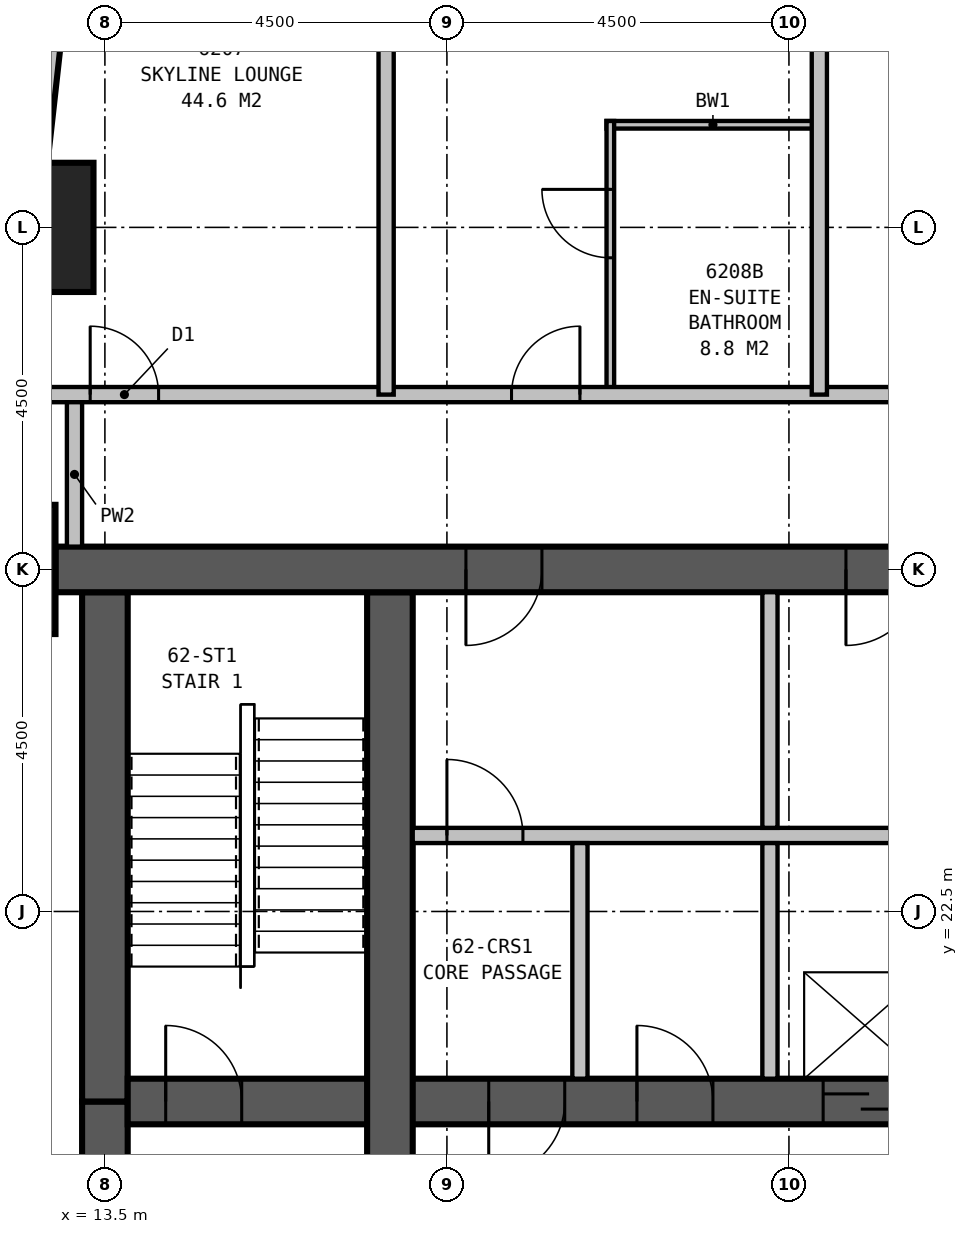
"""IFC4 building model, lengths in metres.
Left out: names, types, materials, properties, quantities, classifications, styles, units other than length and angle.
Written with IfcOpenShell. Run it as: python <this file> out.ifc"""

import sys

from ifc_helpers import new_model, si_unit, direction, frame, frame_2d, origin, origin_2d, place, context, subcontext, project, spatial, rectangle, extrude, element, fill, save


model = new_model("IFC4")
c1 = context("Model", 3, precision=1e-05, world=origin(), true_north=direction((0.0, 1.0)))
c2 = subcontext(c1, "Body", "Model", "MODEL_VIEW")
j1 = project(units=[si_unit("LENGTHUNIT", "METRE"), si_unit("PLANEANGLEUNIT", "RADIAN")], contexts=[c1])
p1 = place(None, origin())
s1 = spatial("IfcSite", under=j1, at=p1, CompositionType="ELEMENT")
p2 = place(p1, origin())
s2 = spatial("IfcBuilding", under=s1, at=p2, CompositionType="ELEMENT")
p3 = place(p2, frame((0.0, 0.0, 240.8)))
s3 = spatial("IfcBuildingStorey", under=s2, at=p3, CompositionType="ELEMENT", Elevation=240.8)
for number, where, z_axis, x_axis in (
    (1, (12.5, 31.5, 0.0), (0.0, 0.0, 1.0), (1.0, 0.0, 0.0)),
    (2, (12.0, 27.0, 0.0), (0.0, 0.0, 1.0), (1.0, 0.0, 0.0)),
):
    element("IfcColumn", number, at=place(p3, frame(where, z_axis=z_axis, x_axis=x_axis)), inside=s3, PredefinedType="COLUMN", context=c2, shape_type="SweptSolid", body=[
        extrude(rectangle(XDim=1.7, YDim=1.7, at=origin_2d()), origin(), (0.0, 0.0, 1.0), 3.9),
    ])
p4 = place(p3, frame((36.3, 27.0, 0.0), z_axis=(0.0, 0.0, 1.0), x_axis=(-1.0, 0.0, 0.0)))
e3 = element("IfcWall", 3, at=p4, inside=s3, PredefinedType="SHEAR", context=c2, shape_type="SweptSolid", body=[
    extrude(rectangle(XDim=23.45, YDim=0.6, at=frame_2d((11.725, 0.0))), origin(), (0.0, 0.0, 1.0), 3.9),
])
p5 = place(p4, frame((17.05, 0.0, 0.0)))
e4 = element("IfcOpeningElement", 4, at=p5, cuts=e3, PredefinedType="OPENING", context=c2, shape_type="SweptSolid", body=[
    extrude(rectangle(XDim=1.0, YDim=2.1, at=frame_2d((0.5, 1.05))), frame((0.0, 0.31, 0.0), z_axis=(0.0, -1.0, 0.0), x_axis=(1.0, 0.0, 0.0)), (0.0, 0.0, 1.0), 0.62),
])
p6 = place(p4, frame((12.05, 0.0, 0.0)))
e5 = element("IfcOpeningElement", 5, at=p6, cuts=e3, PredefinedType="OPENING", context=c2, shape_type="SweptSolid", body=[
    extrude(rectangle(XDim=1.0, YDim=2.1, at=frame_2d((0.5, 1.05))), frame((0.0, 0.31, 0.0), z_axis=(0.0, -1.0, 0.0), x_axis=(1.0, 0.0, 0.0)), (0.0, 0.0, 1.0), 0.62),
])
p7 = place(p4, frame((7.05, 0.0, 0.0)))
e6 = element("IfcOpeningElement", 6, at=p7, cuts=e3, PredefinedType="OPENING", context=c2, shape_type="SweptSolid", body=[
    extrude(rectangle(XDim=1.0, YDim=2.1, at=frame_2d((0.5, 1.05))), frame((0.0, 0.31, 0.0), z_axis=(0.0, -1.0, 0.0), x_axis=(1.0, 0.0, 0.0)), (0.0, 0.0, 1.0), 0.62),
])
p8 = place(p3, frame((17.25, 13.8, 0.0), z_axis=(0.0, 0.0, 1.0), x_axis=(0.0, 1.0, 0.0)))
e7 = element("IfcWall", 7, at=p8, inside=s3, PredefinedType="SHEAR", context=c2, shape_type="SweptSolid", body=[
    extrude(rectangle(XDim=12.9, YDim=0.6, at=frame_2d((6.45, 0.0))), origin(), (0.0, 0.0, 1.0), 3.9),
])
p9 = place(p8, frame((3.85, 0.0, 0.0)))
e8 = element("IfcOpeningElement", 8, at=p9, cuts=e7, PredefinedType="OPENING", context=c2, shape_type="SweptSolid", body=[
    extrude(rectangle(XDim=1.2, YDim=2.1, at=frame_2d((0.6, 1.05))), frame((0.0, 0.31, 0.0), z_axis=(0.0, -1.0, 0.0), x_axis=(1.0, 0.0, 0.0)), (0.0, 0.0, 1.0), 0.62),
])
p10 = place(p3, frame((13.8, 20.0, 0.0), z_axis=(0.0, 0.0, 1.0), x_axis=(1.0, 0.0, 0.0)))
e9 = element("IfcWall", 9, at=p10, inside=s3, PredefinedType="SHEAR", context=c2, shape_type="SweptSolid", body=[
    extrude(rectangle(XDim=21.9, YDim=0.6, at=frame_2d((10.95, 0.0))), origin(), (0.0, 0.0, 1.0), 3.9),
])
p11 = place(p10, frame((0.5, 0.0, 0.0)))
e10 = element("IfcOpeningElement", 10, at=p11, cuts=e9, PredefinedType="OPENING", context=c2, shape_type="SweptSolid", body=[
    extrude(rectangle(XDim=1.0, YDim=2.1, at=frame_2d((0.5, 1.05))), frame((0.0, 0.31, 0.0), z_axis=(0.0, -1.0, 0.0), x_axis=(1.0, 0.0, 0.0)), (0.0, 0.0, 1.0), 0.62),
])
p12 = place(p10, frame((20.5, 0.0, 0.0)))
e11 = element("IfcOpeningElement", 11, at=p12, cuts=e9, PredefinedType="OPENING", context=c2, shape_type="SweptSolid", body=[
    extrude(rectangle(XDim=1.0, YDim=2.1, at=frame_2d((0.5, 1.05))), frame((0.0, 0.31, 0.0), z_axis=(0.0, -1.0, 0.0), x_axis=(1.0, 0.0, 0.0)), (0.0, 0.0, 1.0), 0.62),
])
p13 = place(p10, frame((9.15, 0.0, 0.0)))
e12 = element("IfcOpeningElement", 12, at=p13, cuts=e9, PredefinedType="OPENING", context=c2, shape_type="SweptSolid", body=[
    extrude(rectangle(XDim=1.1, YDim=2.1, at=frame_2d((0.55, 1.05))), frame((0.0, 0.31, 0.0), z_axis=(0.0, -1.0, 0.0), x_axis=(1.0, 0.0, 0.0)), (0.0, 0.0, 1.0), 0.62),
])
p14 = place(p10, frame((11.65, 0.0, 0.0)))
e13 = element("IfcOpeningElement", 13, at=p14, cuts=e9, PredefinedType="OPENING", context=c2, shape_type="SweptSolid", body=[
    extrude(rectangle(XDim=1.1, YDim=2.1, at=frame_2d((0.55, 1.05))), frame((0.0, 0.31, 0.0), z_axis=(0.0, -1.0, 0.0), x_axis=(1.0, 0.0, 0.0)), (0.0, 0.0, 1.0), 0.62),
])
p15 = place(p10, frame((14.15, 0.0, 0.0)))
e14 = element("IfcOpeningElement", 14, at=p15, cuts=e9, PredefinedType="OPENING", context=c2, shape_type="SweptSolid", body=[
    extrude(rectangle(XDim=1.1, YDim=2.1, at=frame_2d((0.55, 1.05))), frame((0.0, 0.31, 0.0), z_axis=(0.0, -1.0, 0.0), x_axis=(1.0, 0.0, 0.0)), (0.0, 0.0, 1.0), 0.62),
])
p16 = place(p10, frame((16.65, 0.0, 0.0)))
e15 = element("IfcOpeningElement", 15, at=p16, cuts=e9, PredefinedType="OPENING", context=c2, shape_type="SweptSolid", body=[
    extrude(rectangle(XDim=1.1, YDim=2.1, at=frame_2d((0.55, 1.05))), frame((0.0, 0.31, 0.0), z_axis=(0.0, -1.0, 0.0), x_axis=(1.0, 0.0, 0.0)), (0.0, 0.0, 1.0), 0.62),
])
p17 = place(p10, frame((5.75, 0.0, 0.0), z_axis=(0.0, 0.0, 1.0), x_axis=(-1.0, 0.0, 0.0)))
e16 = element("IfcOpeningElement", 16, at=p17, cuts=e9, PredefinedType="OPENING", context=c2, shape_type="SweptSolid", body=[
    extrude(rectangle(XDim=1.0, YDim=2.1, at=frame_2d((0.5, 1.05))), frame((0.0, 0.31, 0.0), z_axis=(0.0, -1.0, 0.0), x_axis=(1.0, 0.0, 0.0)), (0.0, 0.0, 1.0), 0.62),
])
p18 = place(p10, frame((6.7, 0.0, 0.0)))
e17 = element("IfcOpeningElement", 17, at=p18, cuts=e9, PredefinedType="OPENING", context=c2, shape_type="SweptSolid", body=[
    extrude(rectangle(XDim=1.0, YDim=2.1, at=frame_2d((0.5, 1.05))), frame((0.0, 0.31, 0.0), z_axis=(0.0, -1.0, 0.0), x_axis=(1.0, 0.0, 0.0)), (0.0, 0.0, 1.0), 0.62),
])
p19 = place(p3, frame((13.5, 26.7, 0.0), z_axis=(0.0, 0.0, 1.0), x_axis=(0.0, -1.0, 0.0)))
e18 = element("IfcWall", 18, at=p19, inside=s3, PredefinedType="SHEAR", context=c2, shape_type="SweptSolid", body=[
    extrude(rectangle(XDim=6.7, YDim=0.6, at=frame_2d((3.35, 0.0))), origin(), (0.0, 0.0, 1.0), 3.9),
])
p20 = place(p3, frame((13.5, 20.0, 0.0), z_axis=(0.0, 0.0, 1.0), x_axis=(0.0, -1.0, 0.0)))
e19 = element("IfcWall", 19, at=p20, inside=s3, PredefinedType="SHEAR", context=c2, shape_type="SweptSolid", body=[
    extrude(rectangle(XDim=3.5, YDim=0.6, at=frame_2d((1.75, 0.0))), origin(), (0.0, 0.0, 1.0), 3.9),
])
p21 = place(p20, frame((1.65, 0.0, 0.0)))
e20 = element("IfcOpeningElement", 20, at=p21, cuts=e19, PredefinedType="OPENING", context=c2, shape_type="SweptSolid", body=[
    extrude(rectangle(XDim=1.2, YDim=2.1, at=frame_2d((0.6, 1.05))), frame((0.0, 0.31, 0.0), z_axis=(0.0, -1.0, 0.0), x_axis=(1.0, 0.0, 0.0)), (0.0, 0.0, 1.0), 0.62),
])
p22 = place(p3, frame((13.517, 40.649, 0.0), z_axis=(0.0, 0.0, 1.0), x_axis=(-0.110433201132, -0.993883548555, 0.0)))
e21 = element("IfcWall", 21, at=p22, inside=s3, PredefinedType="STANDARD", context=c2, shape_type="SweptSolid", body=[
    extrude(rectangle(XDim=31.994, YDim=0.3, at=frame_2d((15.997, 0.0))), origin(), (0.0, 0.0, 1.0), 2.45),
])
p23 = place(p22, frame((1.664, 0.0, 0.5)))
e22 = element("IfcOpeningElement", 22, at=p23, cuts=e21, PredefinedType="OPENING", context=c2, shape_type="SweptSolid", body=[
    extrude(rectangle(XDim=1.5, YDim=1.75, at=frame_2d((0.75, 0.875))), frame((0.0, 0.16, 0.0), z_axis=(0.0, -1.0, 0.0), x_axis=(1.0, 0.0, 0.0)), (0.0, 0.0, 1.0), 0.32),
])
p24 = place(p22, frame((6.192, 0.0, 0.5)))
e23 = element("IfcOpeningElement", 23, at=p24, cuts=e21, PredefinedType="OPENING", context=c2, shape_type="SweptSolid", body=[
    extrude(rectangle(XDim=1.5, YDim=1.75, at=frame_2d((0.75, 0.875))), frame((0.0, 0.16, 0.0), z_axis=(0.0, -1.0, 0.0), x_axis=(1.0, 0.0, 0.0)), (0.0, 0.0, 1.0), 0.32),
])
p25 = place(p22, frame((15.247, 0.0, 0.5)))
e24 = element("IfcOpeningElement", 24, at=p25, cuts=e21, PredefinedType="OPENING", context=c2, shape_type="SweptSolid", body=[
    extrude(rectangle(XDim=1.5, YDim=1.75, at=frame_2d((0.75, 0.875))), frame((0.0, 0.16, 0.0), z_axis=(0.0, -1.0, 0.0), x_axis=(1.0, 0.0, 0.0)), (0.0, 0.0, 1.0), 0.32),
])
p26 = place(p22, frame((19.775, 0.0, 0.5)))
e25 = element("IfcOpeningElement", 25, at=p26, cuts=e21, PredefinedType="OPENING", context=c2, shape_type="SweptSolid", body=[
    extrude(rectangle(XDim=1.5, YDim=1.75, at=frame_2d((0.75, 0.875))), frame((0.0, 0.16, 0.0), z_axis=(0.0, -1.0, 0.0), x_axis=(1.0, 0.0, 0.0)), (0.0, 0.0, 1.0), 0.32),
])
p27 = place(p22, frame((24.302, 0.0, 0.5)))
e26 = element("IfcOpeningElement", 26, at=p27, cuts=e21, PredefinedType="OPENING", context=c2, shape_type="SweptSolid", body=[
    extrude(rectangle(XDim=1.5, YDim=1.75, at=frame_2d((0.75, 0.875))), frame((0.0, 0.16, 0.0), z_axis=(0.0, -1.0, 0.0), x_axis=(1.0, 0.0, 0.0)), (0.0, 0.0, 1.0), 0.32),
])
p28 = place(p22, frame((28.83, 0.0, 0.5)))
e27 = element("IfcOpeningElement", 27, at=p28, cuts=e21, PredefinedType="OPENING", context=c2, shape_type="SweptSolid", body=[
    extrude(rectangle(XDim=1.5, YDim=1.75, at=frame_2d((0.75, 0.875))), frame((0.0, 0.16, 0.0), z_axis=(0.0, -1.0, 0.0), x_axis=(1.0, 0.0, 0.0)), (0.0, 0.0, 1.0), 0.32),
])
p29 = place(p3, frame((12.406, 29.3, 0.0), z_axis=(0.0, 0.0, 1.0), x_axis=(1.0, 0.0, 0.0)))
e28 = element("IfcWall", 28, at=p29, inside=s3, PredefinedType="PARTITIONING", context=c2, shape_type="SweptSolid", body=[
    extrude(rectangle(XDim=25.894, YDim=0.2, at=frame_2d((12.947, 0.0))), origin(), (0.0, 0.0, 1.0), 3.65),
])
p30 = place(p29, frame((0.9, 0.0, 0.0)))
e29 = element("IfcOpeningElement", 29, at=p30, cuts=e28, PredefinedType="OPENING", context=c2, shape_type="SweptSolid", body=[
    extrude(rectangle(XDim=0.9, YDim=2.1, at=frame_2d((0.45, 1.05))), frame((0.0, 0.11, 0.0), z_axis=(0.0, -1.0, 0.0), x_axis=(1.0, 0.0, 0.0)), (0.0, 0.0, 1.0), 0.22),
])
p31 = place(p29, frame((6.444, 0.0, 0.0)))
e30 = element("IfcOpeningElement", 30, at=p31, cuts=e28, PredefinedType="OPENING", context=c2, shape_type="SweptSolid", body=[
    extrude(rectangle(XDim=0.9, YDim=2.1, at=frame_2d((0.45, 1.05))), frame((0.0, 0.11, 0.0), z_axis=(0.0, -1.0, 0.0), x_axis=(1.0, 0.0, 0.0)), (0.0, 0.0, 1.0), 0.22),
])
p32 = place(p29, frame((14.644, 0.0, 0.0)))
e31 = element("IfcOpeningElement", 31, at=p32, cuts=e28, PredefinedType="OPENING", context=c2, shape_type="SweptSolid", body=[
    extrude(rectangle(XDim=0.9, YDim=2.1, at=frame_2d((0.45, 1.05))), frame((0.0, 0.11, 0.0), z_axis=(0.0, -1.0, 0.0), x_axis=(1.0, 0.0, 0.0)), (0.0, 0.0, 1.0), 0.22),
])
p33 = place(p29, frame((24.293, 0.0, 0.0)))
e32 = element("IfcOpeningElement", 32, at=p33, cuts=e28, PredefinedType="OPENING", context=c2, shape_type="SweptSolid", body=[
    extrude(rectangle(XDim=0.9, YDim=2.1, at=frame_2d((0.45, 1.05))), frame((0.0, 0.11, 0.0), z_axis=(0.0, -1.0, 0.0), x_axis=(1.0, 0.0, 0.0)), (0.0, 0.0, 1.0), 0.22),
])
p34 = place(p3, frame((13.1, 27.3, 0.0), z_axis=(0.0, 0.0, 1.0), x_axis=(0.0, 1.0, 0.0)))
e33 = element("IfcWall", 33, at=p34, inside=s3, PredefinedType="PARTITIONING", context=c2, shape_type="SweptSolid", body=[
    extrude(rectangle(XDim=1.9, YDim=0.2, at=frame_2d((0.95, 0.0))), origin(), (0.0, 0.0, 1.0), 2.45),
])
for number, where, z_axis, x_axis in (
    (34, (17.2, 29.3, 0.0), (0.0, 0.0, 1.0), (0.0, 1.0, 0.0)),
    (35, (22.9, 29.3, 0.0), (0.0, 0.0, 1.0), (0.0, 1.0, 0.0)),
):
    element("IfcWall", number, at=place(p3, frame(where, z_axis=z_axis, x_axis=x_axis)), inside=s3, PredefinedType="PARTITIONING", context=c2, shape_type="SweptSolid", body=[
        extrude(rectangle(XDim=11.2, YDim=0.2, at=frame_2d((5.6, 0.0))), origin(), (0.0, 0.0, 1.0), 2.6),
    ])
p35 = place(p3, frame((20.1, 32.85, 0.0), z_axis=(0.0, 0.0, 1.0), x_axis=(1.0, 0.0, 0.0)))
e36 = element("IfcWall", 36, at=p35, inside=s3, PredefinedType="PLUMBINGWALL", context=c2, shape_type="SweptSolid", body=[
    extrude(rectangle(XDim=2.8, YDim=0.1, at=frame_2d((1.4, 0.0))), origin(), (0.0, 0.0, 1.0), 3.65),
])
p36 = place(p3, frame((20.15, 29.3, 0.0), z_axis=(0.0, 0.0, 1.0), x_axis=(0.0, 1.0, 0.0)))
e37 = element("IfcWall", 37, at=p36, inside=s3, PredefinedType="PLUMBINGWALL", context=c2, shape_type="SweptSolid", body=[
    extrude(rectangle(XDim=3.6, YDim=0.1, at=frame_2d((1.8, 0.0))), origin(), (0.0, 0.0, 1.0), 3.65),
])
p37 = place(p36, frame((1.8, 0.0, 0.0)))
e38 = element("IfcOpeningElement", 38, at=p37, cuts=e37, PredefinedType="OPENING", context=c2, shape_type="SweptSolid", body=[
    extrude(rectangle(XDim=0.9, YDim=2.1, at=frame_2d((0.45, 1.05))), frame((0.0, 0.06, 0.0), z_axis=(0.0, -1.0, 0.0), x_axis=(1.0, 0.0, 0.0)), (0.0, 0.0, 1.0), 0.12),
])
for number, where, z_axis, x_axis in (
    (39, (19.75, 20.3, 0.0), (0.0, 0.0, 1.0), (0.0, 1.0, 0.0)),
    (40, (22.25, 20.3, 0.0), (0.0, 0.0, 1.0), (0.0, 1.0, 0.0)),
):
    element("IfcWall", number, at=place(p3, frame(where, z_axis=z_axis, x_axis=x_axis)), inside=s3, PredefinedType="PARTITIONING", context=c2, shape_type="SweptSolid", body=[
        extrude(rectangle(XDim=3.1, YDim=0.2, at=frame_2d((1.55, 0.0))), origin(), (0.0, 0.0, 1.0), 3.65),
    ])
p38 = place(p3, frame((17.55, 23.5, 0.0), z_axis=(0.0, 0.0, 1.0), x_axis=(1.0, 0.0, 0.0)))
e41 = element("IfcWall", 41, at=p38, inside=s3, PredefinedType="PARTITIONING", context=c2, shape_type="SweptSolid", body=[
    extrude(rectangle(XDim=14.4, YDim=0.2, at=frame_2d((7.2, 0.0))), origin(), (0.0, 0.0, 1.0), 3.65),
])
p39 = place(p38, frame((0.45, 0.0, 0.0)))
e42 = element("IfcOpeningElement", 42, at=p39, cuts=e41, PredefinedType="OPENING", context=c2, shape_type="SweptSolid", body=[
    extrude(rectangle(XDim=1.0, YDim=2.1, at=frame_2d((0.5, 1.05))), frame((0.0, 0.11, 0.0), z_axis=(0.0, -1.0, 0.0), x_axis=(1.0, 0.0, 0.0)), (0.0, 0.0, 1.0), 0.22),
])
p40 = place(p3, frame((22.25, 23.6, 0.0), z_axis=(0.0, 0.0, 1.0), x_axis=(0.0, 1.0, 0.0)))
e43 = element("IfcWall", 43, at=p40, inside=s3, PredefinedType="PARTITIONING", context=c2, shape_type="SweptSolid", body=[
    extrude(rectangle(XDim=3.1, YDim=0.2, at=frame_2d((1.55, 0.0))), origin(), (0.0, 0.0, 1.0), 3.65),
])
p41 = place(p24, origin())
e44 = element("IfcWindow", 44, at=p41, inside=s3, PartitioningType="SINGLE_PANEL", PredefinedType="WINDOW", context=c2, shape_type="SweptSolid", body=[
    extrude(rectangle(XDim=1.5, YDim=1.75, at=frame_2d((0.75, 0.875))), frame((0.0, 0.03, 0.0), z_axis=(0.0, -1.0, 0.0), x_axis=(1.0, 0.0, 0.0)), (0.0, 0.0, 1.0), 0.06),
])
fill(e23, e44)
p42 = place(p30, origin())
e45 = element("IfcDoor", 45, at=p42, inside=s3, OperationType="SINGLE_SWING_LEFT", PredefinedType="DOOR", context=c2, shape_type="SweptSolid", body=[
    extrude(rectangle(XDim=0.9, YDim=2.1, at=frame_2d((0.45, 1.05))), frame((0.0, 0.025, 0.0), z_axis=(0.0, -1.0, 0.0), x_axis=(1.0, 0.0, 0.0)), (0.0, 0.0, 1.0), 0.05),
])
fill(e29, e45)
p43 = place(p31, origin())
e46 = element("IfcDoor", 46, at=p43, inside=s3, OperationType="SINGLE_SWING_RIGHT", PredefinedType="DOOR", context=c2, shape_type="SweptSolid", body=[
    extrude(rectangle(XDim=0.9, YDim=2.1, at=frame_2d((0.45, 1.05))), frame((0.0, 0.025, 0.0), z_axis=(0.0, -1.0, 0.0), x_axis=(1.0, 0.0, 0.0)), (0.0, 0.0, 1.0), 0.05),
])
fill(e30, e46)
p44 = place(p37, origin())
e47 = element("IfcDoor", 47, at=p44, inside=s3, OperationType="SINGLE_SWING_RIGHT", PredefinedType="DOOR", context=c2, shape_type="SweptSolid", body=[
    extrude(rectangle(XDim=0.9, YDim=2.1, at=frame_2d((0.45, 1.05))), frame((0.0, 0.025, 0.0), z_axis=(0.0, -1.0, 0.0), x_axis=(1.0, 0.0, 0.0)), (0.0, 0.0, 1.0), 0.05),
])
fill(e38, e47)
p45 = place(p39, origin())
e48 = element("IfcDoor", 48, at=p45, inside=s3, OperationType="SINGLE_SWING_LEFT", PredefinedType="DOOR", context=c2, shape_type="SweptSolid", body=[
    extrude(rectangle(XDim=1.0, YDim=2.1, at=frame_2d((0.5, 1.05))), frame((0.0, 0.025, 0.0), z_axis=(0.0, -1.0, 0.0), x_axis=(1.0, 0.0, 0.0)), (0.0, 0.0, 1.0), 0.05),
])
fill(e42, e48)
p46 = place(p11, origin())
e49 = element("IfcDoor", 49, at=p46, inside=s3, OperationType="SINGLE_SWING_LEFT", PredefinedType="DOOR", context=c2, shape_type="SweptSolid", body=[
    extrude(rectangle(XDim=1.0, YDim=2.1, at=frame_2d((0.5, 1.05))), frame((0.0, 0.3, 0.0), z_axis=(0.0, -1.0, 0.0), x_axis=(1.0, 0.0, 0.0)), (0.0, 0.0, 1.0), 0.6),
])
fill(e10, e49)
p47 = place(p13, origin())
e50 = element("IfcDoor", 50, at=p47, inside=s3, OperationType="SLIDING_TO_LEFT", PredefinedType="DOOR", context=c2, shape_type="SweptSolid", body=[
    extrude(rectangle(XDim=1.1, YDim=2.1, at=frame_2d((0.55, 1.05))), frame((0.0, 0.3, 0.0), z_axis=(0.0, -1.0, 0.0), x_axis=(1.0, 0.0, 0.0)), (0.0, 0.0, 1.0), 0.6),
])
fill(e12, e50)
p48 = place(p17, origin())
e51 = element("IfcDoor", 51, at=p48, inside=s3, OperationType="SINGLE_SWING_RIGHT", PredefinedType="DOOR", context=c2, shape_type="SweptSolid", body=[
    extrude(rectangle(XDim=1.0, YDim=2.1, at=frame_2d((0.5, 1.05))), frame((0.0, 0.3, 0.0), z_axis=(0.0, -1.0, 0.0), x_axis=(1.0, 0.0, 0.0)), (0.0, 0.0, 1.0), 0.6),
])
fill(e16, e51)
p49 = place(p18, origin())
e52 = element("IfcDoor", 52, at=p49, inside=s3, OperationType="SINGLE_SWING_LEFT", PredefinedType="DOOR", context=c2, shape_type="SweptSolid", body=[
    extrude(rectangle(XDim=1.0, YDim=2.1, at=frame_2d((0.5, 1.05))), frame((0.0, 0.3, 0.0), z_axis=(0.0, -1.0, 0.0), x_axis=(1.0, 0.0, 0.0)), (0.0, 0.0, 1.0), 0.6),
])
fill(e17, e52)
p50 = place(p5, origin())
e53 = element("IfcDoor", 53, at=p50, inside=s3, OperationType="SINGLE_SWING_RIGHT", PredefinedType="DOOR", context=c2, shape_type="SweptSolid", body=[
    extrude(rectangle(XDim=1.0, YDim=2.1, at=frame_2d((0.5, 1.05))), frame((0.0, 0.3, 0.0), z_axis=(0.0, -1.0, 0.0), x_axis=(1.0, 0.0, 0.0)), (0.0, 0.0, 1.0), 0.6),
])
fill(e4, e53)
p51 = place(p6, origin())
e54 = element("IfcDoor", 54, at=p51, inside=s3, OperationType="SINGLE_SWING_RIGHT", PredefinedType="DOOR", context=c2, shape_type="SweptSolid", body=[
    extrude(rectangle(XDim=1.0, YDim=2.1, at=frame_2d((0.5, 1.05))), frame((0.0, 0.3, 0.0), z_axis=(0.0, -1.0, 0.0), x_axis=(1.0, 0.0, 0.0)), (0.0, 0.0, 1.0), 0.6),
])
fill(e5, e54)
save(model, sys.argv[1])
